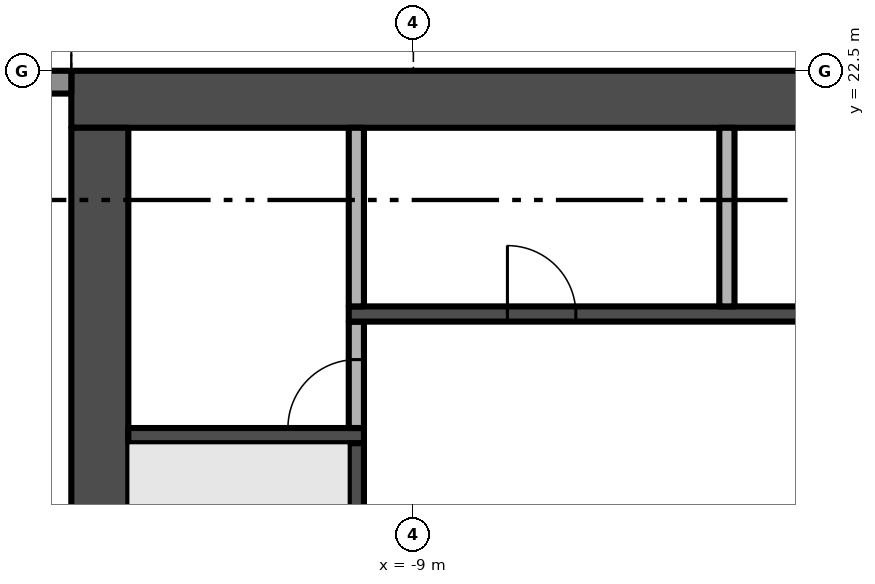
"""IFC4 building model, lengths in metres.
Left out: names, types, materials, properties, quantities, classifications, styles, units other than length and angle.
Written with IfcOpenShell. Run it as: python <this file> out.ifc"""

import sys

from ifc_helpers import new_model, si_unit, direction, frame, frame_2d, origin, place, context, subcontext, project, spatial, rectangle, extrude, element, fill, save


model = new_model("IFC4")
c1 = context("Model", 3, precision=1e-05, world=origin(), true_north=direction((0.0, 1.0)))
c2 = subcontext(c1, "Body", "Model", "MODEL_VIEW")
j1 = project(units=[si_unit("LENGTHUNIT", "METRE"), si_unit("PLANEANGLEUNIT", "RADIAN")], contexts=[c1])
p1 = place(None, origin())
s1 = spatial("IfcSite", under=j1, at=p1, CompositionType="ELEMENT")
p2 = place(p1, origin())
s2 = spatial("IfcBuilding", under=s1, at=p2, CompositionType="ELEMENT")
p3 = place(p2, frame((0.0, 0.0, 166.8)))
s3 = spatial("IfcBuildingStorey", under=s2, at=p3, CompositionType="ELEMENT", Elevation=166.8)
p4 = place(p3, frame((13.5, 22.125, -0.3), z_axis=(0.0, 0.0, 1.0), x_axis=(-1.0, 0.0, 0.0)))
e1 = element("IfcWall", 1, at=p4, inside=s3, PredefinedType="SHEAR", context=c2, shape_type="SweptSolid", body=[
    extrude(rectangle(XDim=27.0, YDim=0.75, at=frame_2d((13.5, 0.0))), origin(), (0.0, 0.0, 1.0), 3.8),
])
p5 = place(p3, frame((-13.125, 21.75, -0.3), z_axis=(0.0, 0.0, 1.0), x_axis=(0.0, -1.0, 0.0)))
e2 = element("IfcWall", 2, at=p5, inside=s3, PredefinedType="SHEAR", context=c2, shape_type="SweptSolid", body=[
    extrude(rectangle(XDim=16.5, YDim=0.75, at=frame_2d((8.25, 0.0))), origin(), (0.0, 0.0, 1.0), 3.8),
])
p6 = place(p5, frame((9.15, 0.0, 0.3)))
e3 = element("IfcOpeningElement", 3, at=p6, cuts=e2, PredefinedType="OPENING", context=c2, shape_type="SweptSolid", body=[
    extrude(rectangle(XDim=1.2, YDim=2.2, at=frame_2d((0.6, 1.1))), frame((0.0, 0.385, 0.0), z_axis=(0.0, -1.0, 0.0), x_axis=(1.0, 0.0, 0.0)), (0.0, 0.0, 1.0), 0.77),
])
p7 = place(p3, frame((-16.9, 22.35, 0.0), z_axis=(0.0, 0.0, 1.0), x_axis=(1.0, 0.0, 0.0)))
e4 = element("IfcWall", 4, at=p7, inside=s3, PredefinedType="SOLIDWALL", context=c2, shape_type="SweptSolid", body=[
    extrude(rectangle(XDim=3.4, YDim=0.3, at=frame_2d((1.7, 0.0))), origin(), (0.0, 0.0, 1.0), 3.5),
])
p8 = place(p7, frame((1.65, 0.0, 0.45)))
e5 = element("IfcOpeningElement", 5, at=p8, cuts=e4, PredefinedType="OPENING", context=c2, shape_type="SweptSolid", body=[
    extrude(rectangle(XDim=1.05, YDim=2.65, at=frame_2d((0.525, 1.325))), frame((0.0, 0.16, 0.0), z_axis=(0.0, -1.0, 0.0), x_axis=(1.0, 0.0, 0.0)), (0.0, 0.0, 1.0), 0.32),
])
p9 = place(p7, frame((0.3, 0.0, 0.0)))
e6 = element("IfcOpeningElement", 6, at=p9, cuts=e4, PredefinedType="OPENING", context=c2, shape_type="SweptSolid", body=[
    extrude(rectangle(XDim=1.2, YDim=2.4, at=frame_2d((0.6, 1.2))), frame((0.0, 0.16, 0.0), z_axis=(0.0, -1.0, 0.0), x_axis=(1.0, 0.0, 0.0)), (0.0, 0.0, 1.0), 0.32),
])
p10 = place(p3, frame((-12.75, 17.7, 0.0), z_axis=(0.0, 0.0, 1.0), x_axis=(1.0, 0.0, 0.0)))
e7 = element("IfcWall", 7, at=p10, inside=s3, PredefinedType="SHEAR", context=c2, shape_type="SweptSolid", body=[
    extrude(rectangle(XDim=3.1, YDim=0.2, at=frame_2d((1.55, 0.0))), origin(), (0.0, 0.0, 1.0), 3.5),
])
p11 = place(p3, frame((-9.75, 16.1, 0.0), z_axis=(0.0, 0.0, 1.0), x_axis=(0.0, 1.0, 0.0)))
e8 = element("IfcWall", 8, at=p11, inside=s3, PredefinedType="SHEAR", context=c2, shape_type="SweptSolid", body=[
    extrude(rectangle(XDim=1.5, YDim=0.2, at=frame_2d((0.75, 0.0))), origin(), (0.0, 0.0, 1.0), 3.5),
])
p12 = place(p3, frame((-9.75, 17.8, 0.0), z_axis=(0.0, 0.0, 1.0), x_axis=(0.0, 1.0, 0.0)))
e9 = element("IfcWall", 9, at=p12, inside=s3, PredefinedType="PARTITIONING", context=c2, shape_type="SweptSolid", body=[
    extrude(rectangle(XDim=1.4, YDim=0.2, at=frame_2d((0.7, 0.0))), origin(), (0.0, 0.0, 1.0), 3.5),
])
p13 = place(p12, origin())
e10 = element("IfcOpeningElement", 10, at=p13, cuts=e9, PredefinedType="OPENING", context=c2, shape_type="SweptSolid", body=[
    extrude(rectangle(XDim=0.9, YDim=2.1, at=frame_2d((0.45, 1.05))), frame((0.0, 0.11, 0.0), z_axis=(0.0, -1.0, 0.0), x_axis=(1.0, 0.0, 0.0)), (0.0, 0.0, 1.0), 0.22),
])
p14 = place(p3, frame((-9.85, 19.3, 0.0), z_axis=(0.0, 0.0, 1.0), x_axis=(1.0, 0.0, 0.0)))
e11 = element("IfcWall", 11, at=p14, inside=s3, PredefinedType="SHEAR", context=c2, shape_type="SweptSolid", body=[
    extrude(rectangle(XDim=19.7, YDim=0.2, at=frame_2d((9.85, 0.0))), origin(), (0.0, 0.0, 1.0), 3.5),
])
p15 = place(p14, frame((10.519, 0.0, 0.0)))
e12 = element("IfcOpeningElement", 12, at=p15, cuts=e11, PredefinedType="OPENING", context=c2, shape_type="SweptSolid", body=[
    extrude(rectangle(XDim=1.1, YDim=2.1, at=frame_2d((0.55, 1.05))), frame((0.0, 0.11, 0.0), z_axis=(0.0, -1.0, 0.0), x_axis=(1.0, 0.0, 0.0)), (0.0, 0.0, 1.0), 0.22),
])
p16 = place(p14, frame((12.956, 0.0, 0.0)))
e13 = element("IfcOpeningElement", 13, at=p16, cuts=e11, PredefinedType="OPENING", context=c2, shape_type="SweptSolid", body=[
    extrude(rectangle(XDim=1.1, YDim=2.1, at=frame_2d((0.55, 1.05))), frame((0.0, 0.11, 0.0), z_axis=(0.0, -1.0, 0.0), x_axis=(1.0, 0.0, 0.0)), (0.0, 0.0, 1.0), 0.22),
])
p17 = place(p14, frame((15.394, 0.0, 0.0)))
e14 = element("IfcOpeningElement", 14, at=p17, cuts=e11, PredefinedType="OPENING", context=c2, shape_type="SweptSolid", body=[
    extrude(rectangle(XDim=1.1, YDim=2.1, at=frame_2d((0.55, 1.05))), frame((0.0, 0.11, 0.0), z_axis=(0.0, -1.0, 0.0), x_axis=(1.0, 0.0, 0.0)), (0.0, 0.0, 1.0), 0.22),
])
p18 = place(p14, frame((17.831, 0.0, 0.0)))
e15 = element("IfcOpeningElement", 15, at=p18, cuts=e11, PredefinedType="OPENING", context=c2, shape_type="SweptSolid", body=[
    extrude(rectangle(XDim=1.1, YDim=2.1, at=frame_2d((0.55, 1.05))), frame((0.0, 0.11, 0.0), z_axis=(0.0, -1.0, 0.0), x_axis=(1.0, 0.0, 0.0)), (0.0, 0.0, 1.0), 0.22),
])
p19 = place(p14, frame((2.087, 0.0, 0.0)))
e16 = element("IfcOpeningElement", 16, at=p19, cuts=e11, PredefinedType="OPENING", context=c2, shape_type="SweptSolid", body=[
    extrude(rectangle(XDim=0.9, YDim=2.1, at=frame_2d((0.45, 1.05))), frame((0.0, 0.11, 0.0), z_axis=(0.0, -1.0, 0.0), x_axis=(1.0, 0.0, 0.0)), (0.0, 0.0, 1.0), 0.22),
])
p20 = place(p14, frame((6.963, 0.0, 0.0)))
e17 = element("IfcOpeningElement", 17, at=p20, cuts=e11, PredefinedType="OPENING", context=c2, shape_type="SweptSolid", body=[
    extrude(rectangle(XDim=0.9, YDim=2.1, at=frame_2d((0.45, 1.05))), frame((0.0, 0.11, 0.0), z_axis=(0.0, -1.0, 0.0), x_axis=(1.0, 0.0, 0.0)), (0.0, 0.0, 1.0), 0.22),
])
for number, where, z_axis, x_axis in (
    (18, (-9.75, 19.4, 0.0), (0.0, 0.0, 1.0), (0.0, 1.0, 0.0)),
    (19, (-4.875, 19.4, 0.0), (0.0, 0.0, 1.0), (0.0, 1.0, 0.0)),
):
    element("IfcWall", number, at=place(p3, frame(where, z_axis=z_axis, x_axis=x_axis)), inside=s3, PredefinedType="PARTITIONING", context=c2, shape_type="SweptSolid", body=[
        extrude(rectangle(XDim=2.35, YDim=0.2, at=frame_2d((1.175, 0.0))), origin(), (0.0, 0.0, 1.0), 3.5),
    ])
p21 = place(p13, origin())
e20 = element("IfcDoor", 20, at=p21, inside=s3, OperationType="SINGLE_SWING_LEFT", PredefinedType="DOOR", context=c2, shape_type="SweptSolid", body=[
    extrude(rectangle(XDim=0.9, YDim=2.1, at=frame_2d((0.45, 1.05))), frame((0.0, 0.025, 0.0), z_axis=(0.0, -1.0, 0.0), x_axis=(1.0, 0.0, 0.0)), (0.0, 0.0, 1.0), 0.05),
])
fill(e10, e20)
p22 = place(p19, origin())
e21 = element("IfcDoor", 21, at=p22, inside=s3, OperationType="SINGLE_SWING_LEFT", PredefinedType="DOOR", context=c2, shape_type="SweptSolid", body=[
    extrude(rectangle(XDim=0.9, YDim=2.1, at=frame_2d((0.45, 1.05))), frame((0.0, 0.025, 0.0), z_axis=(0.0, -1.0, 0.0), x_axis=(1.0, 0.0, 0.0)), (0.0, 0.0, 1.0), 0.05),
])
fill(e16, e21)
save(model, sys.argv[1])
